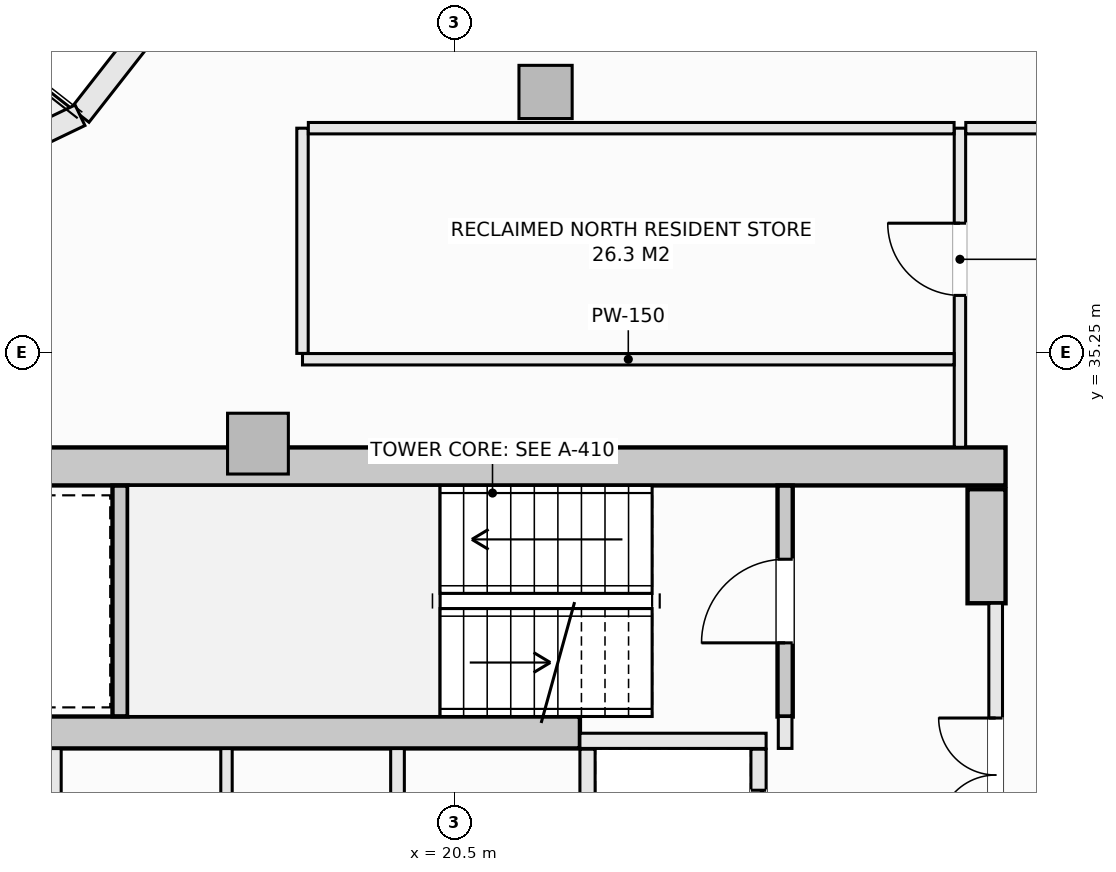
"""IFC4 building model, lengths in metres.
Left out: names, types, materials, properties, quantities, classifications, styles, units other than length and angle.
Written with IfcOpenShell. Run it as: python <this file> out.ifc"""

import sys

from ifc_helpers import new_model, si_unit, direction, frame, frame_2d, origin, origin_2d, place, context, subcontext, project, spatial, rectangle, extrude, element, fill, save


model = new_model("IFC4")
c1 = context("Model", 3, precision=1e-05, world=origin(), true_north=direction((0.0, 1.0)))
c2 = subcontext(c1, "Body", "Model", "MODEL_VIEW")
j1 = project(units=[si_unit("LENGTHUNIT", "METRE"), si_unit("PLANEANGLEUNIT", "RADIAN")], contexts=[c1])
p1 = place(None, origin())
s1 = spatial("IfcSite", under=j1, at=p1, CompositionType="ELEMENT")
p2 = place(p1, origin())
s2 = spatial("IfcBuilding", under=s1, at=p2, CompositionType="ELEMENT")
p3 = place(p2, frame((0.0, 0.0, 242.6)))
s3 = spatial("IfcBuildingStorey", under=s2, at=p3, CompositionType="ELEMENT", Elevation=242.6)
p4 = place(p3, frame((14.25, 33.75, -0.27), z_axis=(0.0, 0.0, 1.0), x_axis=(1.0, 0.0, 0.0)))
e1 = element("IfcWall", 1, at=p4, inside=s3, PredefinedType="SHEAR", context=c2, shape_type="SweptSolid", body=[
    extrude(rectangle(XDim=13.5, YDim=0.5, at=frame_2d((6.75, 0.0))), origin(), (0.0, 0.0, 1.0), 3.3),
])
p5 = place(p3, frame((27.5, 31.95, -0.27), z_axis=(0.0, 0.0, 1.0), x_axis=(0.0, 1.0, 0.0)))
e2 = element("IfcWall", 2, at=p5, inside=s3, PredefinedType="SHEAR", context=c2, shape_type="SweptSolid", body=[
    extrude(rectangle(XDim=1.5, YDim=0.5, at=frame_2d((0.75, 0.0))), origin(), (0.0, 0.0, 1.0), 3.3),
])
p6 = place(p3, frame((14.85, 30.25, -0.27), z_axis=(0.0, 0.0, 1.0), x_axis=(1.0, 0.0, 0.0)))
e3 = element("IfcWall", 3, at=p6, inside=s3, PredefinedType="SHEAR", context=c2, shape_type="SweptSolid", body=[
    extrude(rectangle(XDim=7.3, YDim=0.42, at=frame_2d((3.65, 0.0))), origin(), (0.0, 0.0, 1.0), 3.3),
])
p7 = place(p3, frame((21.698, 38.677, -0.27), z_axis=(0.0, 0.0, 1.0), x_axis=(1.0, 0.0, 0.0)))
e4 = element("IfcColumn", 4, at=p7, inside=s3, PredefinedType="COLUMN", context=c2, shape_type="SweptSolid", body=[
    extrude(rectangle(XDim=0.7, YDim=0.7, at=origin_2d()), origin(), (0.0, 0.0, 1.0), 3.3),
])
p8 = place(p3, frame((17.914, 34.05, -0.27), z_axis=(0.0, 0.0, 1.0), x_axis=(1.0, 0.0, 0.0)))
e5 = element("IfcColumn", 5, at=p8, inside=s3, PredefinedType="PILASTER", context=c2, shape_type="SweptSolid", body=[
    extrude(rectangle(XDim=0.8, YDim=0.8, at=origin_2d()), origin(), (0.0, 0.0, 1.0), 3.3),
])
p9 = place(p3, frame((15.573, 38.37, 0.0), z_axis=(0.0, 0.0, 1.0), x_axis=(0.61644588519, 0.787397276241, 0.0)))
e6 = element("IfcWall", 6, at=p9, inside=s3, PredefinedType="SOLIDWALL", context=c2, shape_type="SweptSolid", body=[
    extrude(rectangle(XDim=5.357, YDim=0.3, at=frame_2d((2.678, 0.0))), origin(), (0.0, 0.0, 1.0), 2.605),
])
p10 = place(p9, frame((1.579, 0.0, 0.72)))
e7 = element("IfcOpeningElement", 7, at=p10, cuts=e6, PredefinedType="OPENING", context=c2, shape_type="SweptSolid", body=[
    extrude(rectangle(XDim=2.2, YDim=1.65, at=frame_2d((1.1, 0.825))), frame((0.0, 0.16, 0.0), z_axis=(0.0, -1.0, 0.0), x_axis=(1.0, 0.0, 0.0)), (0.0, 0.0, 1.0), 0.32),
])
p11 = place(p3, frame((10.639, 36.0, 0.0), z_axis=(0.0, 0.0, 1.0), x_axis=(0.901355238351, 0.433080517106, 0.0)))
e8 = element("IfcWall", 8, at=p11, inside=s3, PredefinedType="SOLIDWALL", context=c2, shape_type="SweptSolid", body=[
    extrude(rectangle(XDim=5.473, YDim=0.3, at=frame_2d((2.737, 0.0))), origin(), (0.0, 0.0, 1.0), 2.605),
])
p12 = place(p11, frame((1.637, 0.0, 0.72)))
e9 = element("IfcOpeningElement", 9, at=p12, cuts=e8, PredefinedType="OPENING", context=c2, shape_type="SweptSolid", body=[
    extrude(rectangle(XDim=2.2, YDim=1.65, at=frame_2d((1.1, 0.825))), frame((0.0, 0.16, 0.0), z_axis=(0.0, -1.0, 0.0), x_axis=(1.0, 0.0, 0.0)), (0.0, 0.0, 1.0), 0.32),
])
p13 = place(p3, frame((24.85, 30.46, -0.27), z_axis=(0.0, 0.0, 1.0), x_axis=(0.0, 1.0, 0.0)))
e10 = element("IfcWall", 10, at=p13, inside=s3, PredefinedType="SHEAR", context=c2, shape_type="SweptSolid", body=[
    extrude(rectangle(XDim=3.038, YDim=0.2, at=frame_2d((1.519, 0.0))), origin(), (0.0, 0.0, 1.0), 3.3),
])
p14 = place(p13, frame((0.969, 0.0, 0.27)))
e11 = element("IfcOpeningElement", 11, at=p14, cuts=e10, PredefinedType="OPENING", context=c2, shape_type="SweptSolid", body=[
    extrude(rectangle(XDim=1.1, YDim=2.15, at=frame_2d((0.55, 1.075))), frame((0.0, 0.11, 0.0), z_axis=(0.0, -1.0, 0.0), x_axis=(1.0, 0.0, 0.0)), (0.0, 0.0, 1.0), 0.22),
])
p15 = place(p3, frame((16.1, 30.462, -0.27), z_axis=(0.0, 0.0, 1.0), x_axis=(0.0, 1.0, 0.0)))
e12 = element("IfcWall", 12, at=p15, inside=s3, PredefinedType="SHEAR", context=c2, shape_type="SweptSolid", body=[
    extrude(rectangle(XDim=3.036, YDim=0.2, at=frame_2d((1.518, 0.0))), origin(), (0.0, 0.0, 1.0), 3.3),
])
p16 = place(p3, frame((22.15, 30.14, 0.0), z_axis=(0.0, 0.0, 1.0), x_axis=(1.0, 0.0, 0.0)))
e13 = element("IfcWall", 13, at=p16, inside=s3, PredefinedType="SOLIDWALL", context=c2, shape_type="SweptSolid", body=[
    extrude(rectangle(XDim=2.45, YDim=0.2, at=frame_2d((1.225, 0.0))), origin(), (0.0, 0.0, 1.0), 3.03),
])
p17 = place(p3, frame((22.25, 27.85, 0.0), z_axis=(0.0, 0.0, 1.0), x_axis=(0.0, 1.0, 0.0)))
e14 = element("IfcWall", 14, at=p17, inside=s3, PredefinedType="SOLIDWALL", context=c2, shape_type="SweptSolid", body=[
    extrude(rectangle(XDim=2.18, YDim=0.2, at=frame_2d((1.09, 0.0))), origin(), (0.0, 0.0, 1.0), 3.03),
])
p18 = place(p3, frame((24.5, 27.85, 0.0), z_axis=(0.0, 0.0, 1.0), x_axis=(0.0, 1.0, 0.0)))
e15 = element("IfcWall", 15, at=p18, inside=s3, PredefinedType="SOLIDWALL", context=c2, shape_type="SweptSolid", body=[
    extrude(rectangle(XDim=2.18, YDim=0.2, at=frame_2d((1.09, 0.0))), origin(), (0.0, 0.0, 1.0), 3.03),
])
p19 = place(p18, frame((0.54, 0.0, 0.0)))
e16 = element("IfcOpeningElement", 16, at=p19, cuts=e15, PredefinedType="OPENING", context=c2, shape_type="SweptSolid", body=[
    extrude(rectangle(XDim=1.1, YDim=2.2, at=frame_2d((0.55, 1.1))), frame((0.0, 0.11, 0.0), z_axis=(0.0, -1.0, 0.0), x_axis=(1.0, 0.0, 0.0)), (0.0, 0.0, 1.0), 0.22),
])
p20 = place(p3, frame((24.85, 30.04, 0.0), z_axis=(0.0, 0.0, 1.0), x_axis=(0.0, 1.0, 0.0)))
e17 = element("IfcWall", 17, at=p20, inside=s3, PredefinedType="SOLIDWALL", context=c2, shape_type="SweptSolid", body=[
    extrude(rectangle(XDim=0.42, YDim=0.18, at=frame_2d((0.21, 0.0))), origin(), (0.0, 0.0, 1.0), 3.03),
])
p21 = place(p3, frame((27.62, 22.05, 0.0), z_axis=(0.0, 0.0, 1.0), x_axis=(0.0, 1.0, 0.0)))
e18 = element("IfcWall", 18, at=p21, inside=s3, PredefinedType="SOLIDWALL", context=c2, shape_type="SweptSolid", body=[
    extrude(rectangle(XDim=9.9, YDim=0.18, at=frame_2d((4.95, 0.0))), origin(), (0.0, 0.0, 1.0), 3.03),
])
p22 = place(p21, frame((4.475, 0.0, 0.0)))
e19 = element("IfcOpeningElement", 19, at=p22, cuts=e18, PredefinedType="OPENING", context=c2, shape_type="SweptSolid", body=[
    extrude(rectangle(XDim=0.95, YDim=2.1, at=frame_2d((0.475, 1.05))), frame((0.0, 0.1, 0.0), z_axis=(0.0, -1.0, 0.0), x_axis=(1.0, 0.0, 0.0)), (0.0, 0.0, 1.0), 0.2),
])
p23 = place(p21, frame((6.89, 0.0, 0.0)))
e20 = element("IfcOpeningElement", 20, at=p23, cuts=e18, PredefinedType="OPENING", context=c2, shape_type="SweptSolid", body=[
    extrude(rectangle(XDim=1.5, YDim=2.2, at=frame_2d((0.75, 1.1))), frame((0.0, 0.1, 0.0), z_axis=(0.0, -1.0, 0.0), x_axis=(1.0, 0.0, 0.0)), (0.0, 0.0, 1.0), 0.2),
])
p24 = place(p21, frame((1.51, 0.0, 0.0)))
e21 = element("IfcOpeningElement", 21, at=p24, cuts=e18, PredefinedType="OPENING", context=c2, shape_type="SweptSolid", body=[
    extrude(rectangle(XDim=1.5, YDim=2.2, at=frame_2d((0.75, 1.1))), frame((0.0, 0.1, 0.0), z_axis=(0.0, -1.0, 0.0), x_axis=(1.0, 0.0, 0.0)), (0.0, 0.0, 1.0), 0.2),
])
p25 = place(p3, frame((15.25, 27.932, 0.0), z_axis=(0.0, 0.0, 1.0), x_axis=(0.0, 1.0, 0.0)))
e22 = element("IfcWall", 22, at=p25, inside=s3, PredefinedType="PARTITIONING", context=c2, shape_type="SweptSolid", body=[
    extrude(rectangle(XDim=2.106, YDim=0.15, at=frame_2d((1.053, 0.0))), origin(), (0.0, 0.0, 1.0), 3.03),
])
p26 = place(p3, frame((19.75, 27.932, 0.0), z_axis=(0.0, 0.0, 1.0), x_axis=(0.0, 1.0, 0.0)))
e23 = element("IfcWall", 23, at=p26, inside=s3, PredefinedType="SOLIDWALL", context=c2, shape_type="SweptSolid", body=[
    extrude(rectangle(XDim=2.106, YDim=0.18, at=frame_2d((1.053, 0.0))), origin(), (0.0, 0.0, 1.0), 3.03),
])
p27 = place(p3, frame((17.5, 27.932, 0.0), z_axis=(0.0, 0.0, 1.0), x_axis=(0.0, 1.0, 0.0)))
e24 = element("IfcWall", 24, at=p27, inside=s3, PredefinedType="PARTITIONING", context=c2, shape_type="SweptSolid", body=[
    extrude(rectangle(XDim=2.106, YDim=0.15, at=frame_2d((1.053, 0.0))), origin(), (0.0, 0.0, 1.0), 3.03),
])
p28 = place(p3, frame((27.15, 34.002, 0.0), z_axis=(0.0, 0.0, 1.0), x_axis=(0.0, 1.0, 0.0)))
e25 = element("IfcWall", 25, at=p28, inside=s3, PredefinedType="PARTITIONING", context=c2, shape_type="SweptSolid", body=[
    extrude(rectangle(XDim=4.198, YDim=0.15, at=frame_2d((2.099, 0.0))), origin(), (0.0, 0.0, 1.0), 3.03),
])
p29 = place(p28, frame((1.998, 0.0, 0.0)))
e26 = element("IfcOpeningElement", 26, at=p29, cuts=e25, PredefinedType="OPENING", context=c2, shape_type="SweptSolid", body=[
    extrude(rectangle(XDim=0.95, YDim=2.1, at=frame_2d((0.475, 1.05))), frame((0.0, 0.085, 0.0), z_axis=(0.0, -1.0, 0.0), x_axis=(1.0, 0.0, 0.0)), (0.0, 0.0, 1.0), 0.17),
])
p30 = place(p3, frame((18.5, 35.16, 0.0), z_axis=(0.0, 0.0, 1.0), x_axis=(1.0, 0.0, 0.0)))
e27 = element("IfcWall", 27, at=p30, inside=s3, PredefinedType="PARTITIONING", context=c2, shape_type="SweptSolid", body=[
    extrude(rectangle(XDim=8.573, YDim=0.15, at=frame_2d((4.287, 0.0))), origin(), (0.0, 0.0, 1.0), 3.03),
])
p31 = place(p3, frame((18.5, 35.237, 0.0), z_axis=(0.0, 0.0, 1.0), x_axis=(0.0, 1.0, 0.0)))
e28 = element("IfcWall", 28, at=p31, inside=s3, PredefinedType="PARTITIONING", context=c2, shape_type="SweptSolid", body=[
    extrude(rectangle(XDim=2.963, YDim=0.15, at=frame_2d((1.481, 0.0))), origin(), (0.0, 0.0, 1.0), 3.03),
])
p32 = place(p3, frame((18.577, 38.2, 0.0), z_axis=(0.0, 0.0, 1.0), x_axis=(1.0, 0.0, 0.0)))
e29 = element("IfcWall", 29, at=p32, inside=s3, PredefinedType="PARTITIONING", context=c2, shape_type="SweptSolid", body=[
    extrude(rectangle(XDim=8.496, YDim=0.15, at=frame_2d((4.248, 0.0))), origin(), (0.0, 0.0, 1.0), 3.03),
])
p33 = place(p3, frame((27.227, 38.2, 0.0), z_axis=(0.0, 0.0, 1.0), x_axis=(1.0, 0.0, 0.0)))
e30 = element("IfcWall", 30, at=p33, inside=s3, PredefinedType="PARTITIONING", context=c2, shape_type="SweptSolid", body=[
    extrude(rectangle(XDim=2.733, YDim=0.15, at=frame_2d((1.366, 0.0))), origin(), (0.0, 0.0, 1.0), 3.03),
])
p34 = place(p14, origin())
e31 = element("IfcDoor", 31, at=p34, inside=s3, OperationType="SINGLE_SWING_LEFT", PredefinedType="DOOR", context=c2, shape_type="SweptSolid", body=[
    extrude(rectangle(XDim=1.1, YDim=2.15, at=frame_2d((0.55, 1.075))), frame((0.0, 0.025, 0.0), z_axis=(0.0, -1.0, 0.0), x_axis=(1.0, 0.0, 0.0)), (0.0, 0.0, 1.0), 0.05),
])
fill(e11, e31)
p35 = place(p19, origin())
e32 = element("IfcDoor", 32, at=p35, inside=s3, OperationType="SLIDING_TO_LEFT", PredefinedType="DOOR", context=c2, shape_type="SweptSolid", body=[
    extrude(rectangle(XDim=1.1, YDim=2.2, at=frame_2d((0.55, 1.1))), frame((0.0, 0.025, 0.0), z_axis=(0.0, -1.0, 0.0), x_axis=(1.0, 0.0, 0.0)), (0.0, 0.0, 1.0), 0.05),
])
fill(e16, e32)
p36 = place(p23, origin())
e33 = element("IfcDoor", 33, at=p36, inside=s3, OperationType="DOUBLE_DOOR_SINGLE_SWING", PredefinedType="DOOR", context=c2, shape_type="SweptSolid", body=[
    extrude(rectangle(XDim=1.5, YDim=2.2, at=frame_2d((0.75, 1.1))), frame((0.0, 0.025, 0.0), z_axis=(0.0, -1.0, 0.0), x_axis=(1.0, 0.0, 0.0)), (0.0, 0.0, 1.0), 0.05),
])
fill(e20, e33)
p37 = place(p29, origin())
e34 = element("IfcDoor", 34, at=p37, inside=s3, OperationType="SINGLE_SWING_RIGHT", PredefinedType="DOOR", context=c2, shape_type="SweptSolid", body=[
    extrude(rectangle(XDim=0.95, YDim=2.1, at=frame_2d((0.475, 1.05))), frame((0.0, 0.025, 0.0), z_axis=(0.0, -1.0, 0.0), x_axis=(1.0, 0.0, 0.0)), (0.0, 0.0, 1.0), 0.05),
])
fill(e26, e34)
save(model, sys.argv[1])
